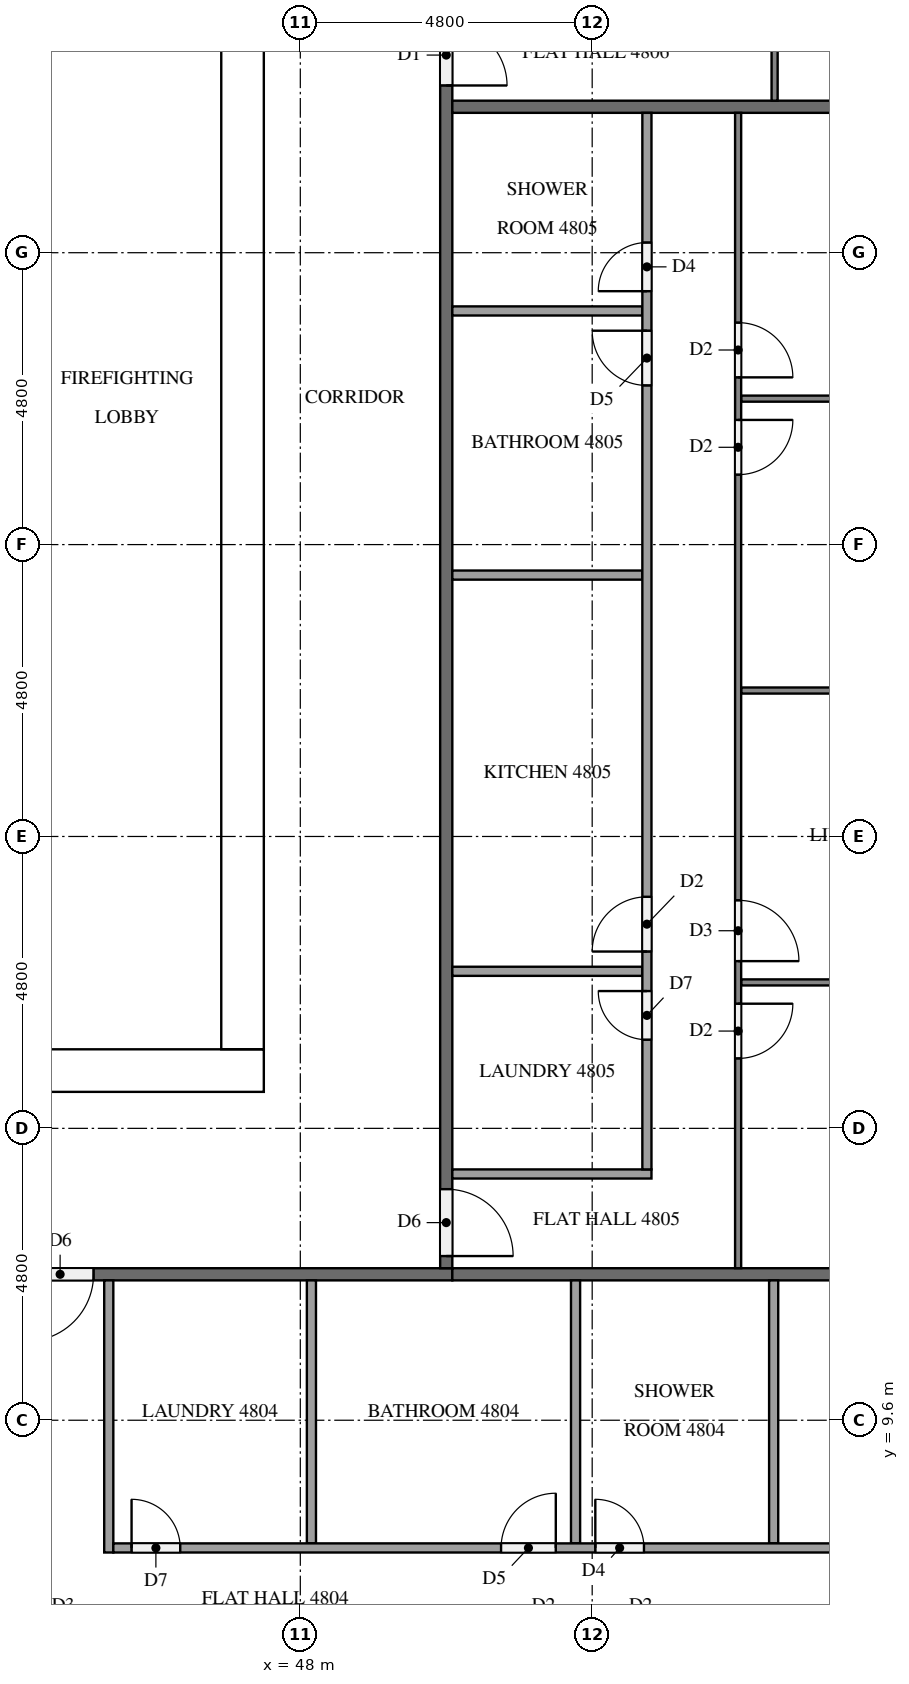
"""IFC4 building model, lengths in metres.
Left out: names, types, materials, properties, quantities, classifications, styles, units other than length and angle.
Written with IfcOpenShell. Run it as: python <this file> out.ifc"""

import sys

from ifc_helpers import new_model, si_unit, direction, frame, frame_2d, origin, place, context, subcontext, project, spatial, rectangle, extrude, element, fill, save


model = new_model("IFC4")
c1 = context("Model", 3, precision=1e-05, world=origin(), true_north=direction((0.0, 1.0)))
c2 = subcontext(c1, "Body", "Model", "MODEL_VIEW")
j1 = project(units=[si_unit("LENGTHUNIT", "METRE"), si_unit("PLANEANGLEUNIT", "RADIAN")], contexts=[c1])
p1 = place(None, origin())
s1 = spatial("IfcSite", under=j1, at=p1, CompositionType="ELEMENT")
p2 = place(p1, origin())
s2 = spatial("IfcBuilding", under=s1, at=p2, CompositionType="ELEMENT")
p3 = place(p2, frame((0.0, 0.0, 185.9)))
s3 = spatial("IfcBuildingStorey", under=s2, at=p3, CompositionType="ELEMENT", Elevation=185.9)
p4 = place(p3, frame((15.0, 15.35, 0.0), z_axis=(0.0, 0.0, 1.0), x_axis=(1.0, 0.0, 0.0)))
e1 = element("IfcWall", 1, at=p4, inside=s3, PredefinedType="SHEAR", context=c2, shape_type="SweptSolid", body=[
    extrude(rectangle(XDim=32.4, YDim=0.7, at=frame_2d((16.2, 0.0))), origin(), (0.0, 0.0, 1.0), 3.2),
])
p5 = place(p4, frame((15.3, 0.0, 0.0)))
e2 = element("IfcOpeningElement", 2, at=p5, cuts=e1, PredefinedType="OPENING", context=c2, shape_type="SweptSolid", body=[
    extrude(rectangle(XDim=1.8, YDim=2.1, at=frame_2d((0.9, 1.05))), frame((0.0, 0.36, 0.0), z_axis=(0.0, -1.0, 0.0), x_axis=(1.0, 0.0, 0.0)), (0.0, 0.0, 1.0), 0.72),
])
p6 = place(p3, frame((47.05, 15.7, 0.0), z_axis=(0.0, 0.0, 1.0), x_axis=(0.0, 1.0, 0.0)))
e3 = element("IfcWall", 3, at=p6, inside=s3, PredefinedType="SHEAR", context=c2, shape_type="SweptSolid", body=[
    extrude(rectangle(XDim=21.4, YDim=0.7, at=frame_2d((10.7, 0.0))), origin(), (0.0, 0.0, 1.0), 3.2),
])
p7 = place(p6, frame((10.4, 0.0, 0.0)))
e4 = element("IfcOpeningElement", 4, at=p7, cuts=e3, PredefinedType="OPENING", context=c2, shape_type="SweptSolid", body=[
    extrude(rectangle(XDim=1.2, YDim=2.1, at=frame_2d((0.6, 1.05))), frame((0.0, 0.36, 0.0), z_axis=(0.0, -1.0, 0.0), x_axis=(1.0, 0.0, 0.0)), (0.0, 0.0, 1.0), 0.72),
])
p8 = place(p3, frame((50.5, 12.0, 0.0), z_axis=(0.0, 0.0, 1.0), x_axis=(-1.0, 0.0, 0.0)))
e5 = element("IfcWall", 5, at=p8, inside=s3, PredefinedType="PARTITIONING", context=c2, shape_type="SweptSolid", body=[
    extrude(rectangle(XDim=38.6, YDim=0.2, at=frame_2d((19.3, 0.0))), origin(), (0.0, 0.0, 1.0), 3.2),
])
p9 = place(p8, frame((31.65, 0.0, 0.0)))
e6 = element("IfcOpeningElement", 6, at=p9, cuts=e5, PredefinedType="OPENING", context=c2, shape_type="SweptSolid", body=[
    extrude(rectangle(XDim=1.0, YDim=2.1, at=frame_2d((0.5, 1.05))), frame((0.0, 0.11, 0.0), z_axis=(0.0, -1.0, 0.0), x_axis=(1.0, 0.0, 0.0)), (0.0, 0.0, 1.0), 0.22),
])
p10 = place(p8, frame((17.25, 0.0, 0.0)))
e7 = element("IfcOpeningElement", 7, at=p10, cuts=e5, PredefinedType="OPENING", context=c2, shape_type="SweptSolid", body=[
    extrude(rectangle(XDim=1.0, YDim=2.1, at=frame_2d((0.5, 1.05))), frame((0.0, 0.11, 0.0), z_axis=(0.0, -1.0, 0.0), x_axis=(1.0, 0.0, 0.0)), (0.0, 0.0, 1.0), 0.22),
])
p11 = place(p8, frame((7.65, 0.0, 0.0)))
e8 = element("IfcOpeningElement", 8, at=p11, cuts=e5, PredefinedType="OPENING", context=c2, shape_type="SweptSolid", body=[
    extrude(rectangle(XDim=1.0, YDim=2.1, at=frame_2d((0.5, 1.05))), frame((0.0, 0.11, 0.0), z_axis=(0.0, -1.0, 0.0), x_axis=(1.0, 0.0, 0.0)), (0.0, 0.0, 1.0), 0.22),
])
p12 = place(p8, frame((5.9, 0.0, 0.0)))
e9 = element("IfcOpeningElement", 9, at=p12, cuts=e5, PredefinedType="OPENING", context=c2, shape_type="SweptSolid", body=[
    extrude(rectangle(XDim=1.1, YDim=2.1, at=frame_2d((0.55, 1.05))), frame((0.0, 0.11, 0.0), z_axis=(0.0, -1.0, 0.0), x_axis=(1.0, 0.0, 0.0)), (0.0, 0.0, 1.0), 0.22),
])
p13 = place(p3, frame((50.4, 40.7, 0.0), z_axis=(0.0, 0.0, 1.0), x_axis=(0.0, -1.0, 0.0)))
e10 = element("IfcWall", 10, at=p13, inside=s3, PredefinedType="PARTITIONING", context=c2, shape_type="SweptSolid", body=[
    extrude(rectangle(XDim=28.6, YDim=0.2, at=frame_2d((14.3, 0.0))), origin(), (0.0, 0.0, 1.0), 3.2),
])
p14 = place(p13, frame((27.3, 0.0, 0.0)))
e11 = element("IfcOpeningElement", 11, at=p14, cuts=e10, PredefinedType="OPENING", context=c2, shape_type="SweptSolid", body=[
    extrude(rectangle(XDim=1.1, YDim=2.1, at=frame_2d((0.55, 1.05))), frame((0.0, 0.11, 0.0), z_axis=(0.0, -1.0, 0.0), x_axis=(1.0, 0.0, 0.0)), (0.0, 0.0, 1.0), 0.22),
])
p15 = place(p13, frame((8.15, 0.0, 0.0)))
e12 = element("IfcOpeningElement", 12, at=p15, cuts=e10, PredefinedType="OPENING", context=c2, shape_type="SweptSolid", body=[
    extrude(rectangle(XDim=1.0, YDim=2.1, at=frame_2d((0.5, 1.05))), frame((0.0, 0.11, 0.0), z_axis=(0.0, -1.0, 0.0), x_axis=(1.0, 0.0, 0.0)), (0.0, 0.0, 1.0), 0.22),
])
p16 = place(p13, frame((0.95, 0.0, 0.0)))
e13 = element("IfcOpeningElement", 13, at=p16, cuts=e10, PredefinedType="OPENING", context=c2, shape_type="SweptSolid", body=[
    extrude(rectangle(XDim=1.0, YDim=2.1, at=frame_2d((0.5, 1.05))), frame((0.0, 0.11, 0.0), z_axis=(0.0, -1.0, 0.0), x_axis=(1.0, 0.0, 0.0)), (0.0, 0.0, 1.0), 0.22),
])
for number, where, z_axis, x_axis in (
    (14, (50.5, 12.0, 0.0), (0.0, 0.0, 1.0), (1.0, 0.0, 0.0)),
    (15, (50.5, 31.2, 0.0), (0.0, 0.0, 1.0), (1.0, 0.0, 0.0)),
):
    element("IfcWall", number, at=place(p3, frame(where, z_axis=z_axis, x_axis=x_axis)), inside=s3, PredefinedType="PARTITIONING", context=c2, shape_type="SweptSolid", body=[
        extrude(rectangle(XDim=11.8, YDim=0.2, at=frame_2d((5.9, 0.0))), origin(), (0.0, 0.0, 1.0), 3.2),
    ])
for number, where, z_axis, x_axis in (
    (16, (48.183, 11.9, 0.0), (0.0, 0.0, 1.0), (0.0, -1.0, 0.0)),
    (17, (52.527, 11.9, 0.0), (0.0, 0.0, 1.0), (0.0, -1.0, 0.0)),
    (18, (55.784, 11.9, 0.0), (0.0, 0.0, 1.0), (0.0, -1.0, 0.0)),
):
    element("IfcWall", number, at=place(p3, frame(where, z_axis=z_axis, x_axis=x_axis)), inside=s3, PredefinedType="PARTITIONING", context=c2, shape_type="SweptSolid", body=[
        extrude(rectangle(XDim=4.325, YDim=0.15, at=frame_2d((2.163, 0.0))), origin(), (0.0, 0.0, 1.0), 3.2),
    ])
p17 = place(p3, frame((44.85, 11.9, 0.0), z_axis=(0.0, 0.0, 1.0), x_axis=(0.0, -1.0, 0.0)))
e19 = element("IfcWall", 19, at=p17, inside=s3, PredefinedType="PARTITIONING", context=c2, shape_type="SweptSolid", body=[
    extrude(rectangle(XDim=4.475, YDim=0.15, at=frame_2d((2.237, 0.0))), origin(), (0.0, 0.0, 1.0), 3.2),
])
p18 = place(p3, frame((44.925, 7.5, 0.0), z_axis=(0.0, 0.0, 1.0), x_axis=(1.0, 0.0, 0.0)))
e20 = element("IfcWall", 20, at=p18, inside=s3, PredefinedType="PARTITIONING", context=c2, shape_type="SweptSolid", body=[
    extrude(rectangle(XDim=17.375, YDim=0.15, at=frame_2d((8.688, 0.0))), origin(), (0.0, 0.0, 1.0), 3.2),
])
p19 = place(p18, frame((0.3, 0.0, 0.0)))
e21 = element("IfcOpeningElement", 21, at=p19, cuts=e20, PredefinedType="OPENING", context=c2, shape_type="SweptSolid", body=[
    extrude(rectangle(XDim=0.8, YDim=2.1, at=frame_2d((0.4, 1.05))), frame((0.0, 0.085, 0.0), z_axis=(0.0, -1.0, 0.0), x_axis=(1.0, 0.0, 0.0)), (0.0, 0.0, 1.0), 0.17),
])
p20 = place(p18, frame((6.377, 0.0, 0.0)))
e22 = element("IfcOpeningElement", 22, at=p20, cuts=e20, PredefinedType="OPENING", context=c2, shape_type="SweptSolid", body=[
    extrude(rectangle(XDim=0.9, YDim=2.1, at=frame_2d((0.45, 1.05))), frame((0.0, 0.085, 0.0), z_axis=(0.0, -1.0, 0.0), x_axis=(1.0, 0.0, 0.0)), (0.0, 0.0, 1.0), 0.17),
])
p21 = place(p18, frame((7.927, 0.0, 0.0)))
e23 = element("IfcOpeningElement", 23, at=p21, cuts=e20, PredefinedType="OPENING", context=c2, shape_type="SweptSolid", body=[
    extrude(rectangle(XDim=0.8, YDim=2.1, at=frame_2d((0.4, 1.05))), frame((0.0, 0.085, 0.0), z_axis=(0.0, -1.0, 0.0), x_axis=(1.0, 0.0, 0.0)), (0.0, 0.0, 1.0), 0.17),
])
p22 = place(p18, frame((16.125, 0.0, 0.0)))
e24 = element("IfcOpeningElement", 24, at=p22, cuts=e20, PredefinedType="OPENING", context=c2, shape_type="SweptSolid", body=[
    extrude(rectangle(XDim=0.9, YDim=2.1, at=frame_2d((0.45, 1.05))), frame((0.0, 0.085, 0.0), z_axis=(0.0, -1.0, 0.0), x_axis=(1.0, 0.0, 0.0)), (0.0, 0.0, 1.0), 0.17),
])
for number, where, z_axis, x_axis in (
    (25, (55.25, 16.8, 0.0), (0.0, 0.0, 1.0), (1.0, 0.0, 0.0)),
    (26, (55.25, 21.6, 0.0), (0.0, 0.0, 1.0), (1.0, 0.0, 0.0)),
    (27, (55.25, 26.4, 0.0), (0.0, 0.0, 1.0), (1.0, 0.0, 0.0)),
):
    element("IfcWall", number, at=place(p3, frame(where, z_axis=z_axis, x_axis=x_axis)), inside=s3, PredefinedType="PARTITIONING", context=c2, shape_type="SweptSolid", body=[
        extrude(rectangle(XDim=7.05, YDim=0.1, at=frame_2d((3.525, 0.0))), origin(), (0.0, 0.0, 1.0), 3.2),
    ])
p23 = place(p3, frame((55.2, 31.1, 0.0), z_axis=(0.0, 0.0, 1.0), x_axis=(0.0, -1.0, 0.0)))
e28 = element("IfcWall", 28, at=p23, inside=s3, PredefinedType="PARTITIONING", context=c2, shape_type="SweptSolid", body=[
    extrude(rectangle(XDim=19.0, YDim=0.1, at=frame_2d((9.5, 0.0))), origin(), (0.0, 0.0, 1.0), 3.2),
])
p24 = place(p23, frame((14.65, 0.0, 0.0)))
e29 = element("IfcOpeningElement", 29, at=p24, cuts=e28, PredefinedType="OPENING", context=c2, shape_type="SweptSolid", body=[
    extrude(rectangle(XDim=0.9, YDim=2.1, at=frame_2d((0.45, 1.05))), frame((0.0, 0.06, 0.0), z_axis=(0.0, -1.0, 0.0), x_axis=(1.0, 0.0, 0.0)), (0.0, 0.0, 1.0), 0.12),
])
p25 = place(p23, frame((12.95, 0.0, 0.0)))
e30 = element("IfcOpeningElement", 30, at=p25, cuts=e28, PredefinedType="OPENING", context=c2, shape_type="SweptSolid", body=[
    extrude(rectangle(XDim=1.0, YDim=2.1, at=frame_2d((0.5, 1.05))), frame((0.0, 0.06, 0.0), z_axis=(0.0, -1.0, 0.0), x_axis=(1.0, 0.0, 0.0)), (0.0, 0.0, 1.0), 0.12),
])
p26 = place(p23, frame((5.05, 0.0, 0.0)))
e31 = element("IfcOpeningElement", 31, at=p26, cuts=e28, PredefinedType="OPENING", context=c2, shape_type="SweptSolid", body=[
    extrude(rectangle(XDim=0.9, YDim=2.1, at=frame_2d((0.45, 1.05))), frame((0.0, 0.06, 0.0), z_axis=(0.0, -1.0, 0.0), x_axis=(1.0, 0.0, 0.0)), (0.0, 0.0, 1.0), 0.12),
])
p27 = place(p23, frame((3.45, 0.0, 0.0)))
e32 = element("IfcOpeningElement", 32, at=p27, cuts=e28, PredefinedType="OPENING", context=c2, shape_type="SweptSolid", body=[
    extrude(rectangle(XDim=0.9, YDim=2.1, at=frame_2d((0.45, 1.05))), frame((0.0, 0.06, 0.0), z_axis=(0.0, -1.0, 0.0), x_axis=(1.0, 0.0, 0.0)), (0.0, 0.0, 1.0), 0.12),
])
for number, where, z_axis, x_axis in (
    (33, (50.5, 16.983, 0.0), (0.0, 0.0, 1.0), (1.0, 0.0, 0.0)),
    (34, (50.5, 23.498, 0.0), (0.0, 0.0, 1.0), (1.0, 0.0, 0.0)),
    (35, (50.5, 27.842, 0.0), (0.0, 0.0, 1.0), (1.0, 0.0, 0.0)),
):
    element("IfcWall", number, at=place(p3, frame(where, z_axis=z_axis, x_axis=x_axis)), inside=s3, PredefinedType="PARTITIONING", context=c2, shape_type="SweptSolid", body=[
        extrude(rectangle(XDim=3.125, YDim=0.15, at=frame_2d((1.562, 0.0))), origin(), (0.0, 0.0, 1.0), 3.2),
    ])
p28 = place(p3, frame((50.5, 13.65, 0.0), z_axis=(0.0, 0.0, 1.0), x_axis=(1.0, 0.0, 0.0)))
e36 = element("IfcWall", 36, at=p28, inside=s3, PredefinedType="PARTITIONING", context=c2, shape_type="SweptSolid", body=[
    extrude(rectangle(XDim=3.275, YDim=0.15, at=frame_2d((1.637, 0.0))), origin(), (0.0, 0.0, 1.0), 3.2),
])
p29 = place(p3, frame((53.7, 13.725, 0.0), z_axis=(0.0, 0.0, 1.0), x_axis=(0.0, 1.0, 0.0)))
e37 = element("IfcWall", 37, at=p29, inside=s3, PredefinedType="PARTITIONING", context=c2, shape_type="SweptSolid", body=[
    extrude(rectangle(XDim=17.375, YDim=0.15, at=frame_2d((8.688, 0.0))), origin(), (0.0, 0.0, 1.0), 3.2),
])
p30 = place(p29, frame((2.133, 0.0, 0.0)))
e38 = element("IfcOpeningElement", 38, at=p30, cuts=e37, PredefinedType="OPENING", context=c2, shape_type="SweptSolid", body=[
    extrude(rectangle(XDim=0.8, YDim=2.1, at=frame_2d((0.4, 1.05))), frame((0.0, 0.085, 0.0), z_axis=(0.0, -1.0, 0.0), x_axis=(1.0, 0.0, 0.0)), (0.0, 0.0, 1.0), 0.17),
])
p31 = place(p29, frame((3.583, 0.0, 0.0)))
e39 = element("IfcOpeningElement", 39, at=p31, cuts=e37, PredefinedType="OPENING", context=c2, shape_type="SweptSolid", body=[
    extrude(rectangle(XDim=0.9, YDim=2.1, at=frame_2d((0.45, 1.05))), frame((0.0, 0.085, 0.0), z_axis=(0.0, -1.0, 0.0), x_axis=(1.0, 0.0, 0.0)), (0.0, 0.0, 1.0), 0.17),
])
p32 = place(p29, frame((12.892, 0.0, 0.0)))
e40 = element("IfcOpeningElement", 40, at=p32, cuts=e37, PredefinedType="OPENING", context=c2, shape_type="SweptSolid", body=[
    extrude(rectangle(XDim=0.9, YDim=2.1, at=frame_2d((0.45, 1.05))), frame((0.0, 0.085, 0.0), z_axis=(0.0, -1.0, 0.0), x_axis=(1.0, 0.0, 0.0)), (0.0, 0.0, 1.0), 0.17),
])
p33 = place(p29, frame((14.442, 0.0, 0.0)))
e41 = element("IfcOpeningElement", 41, at=p33, cuts=e37, PredefinedType="OPENING", context=c2, shape_type="SweptSolid", body=[
    extrude(rectangle(XDim=0.8, YDim=2.1, at=frame_2d((0.4, 1.05))), frame((0.0, 0.085, 0.0), z_axis=(0.0, -1.0, 0.0), x_axis=(1.0, 0.0, 0.0)), (0.0, 0.0, 1.0), 0.17),
])
p34 = place(p3, frame((55.8, 38.3, 0.0), z_axis=(0.0, 0.0, 1.0), x_axis=(0.0, -1.0, 0.0)))
e42 = element("IfcWall", 42, at=p34, inside=s3, PredefinedType="PARTITIONING", context=c2, shape_type="SweptSolid", body=[
    extrude(rectangle(XDim=7.0, YDim=0.1, at=frame_2d((3.5, 0.0))), origin(), (0.0, 0.0, 1.0), 3.2),
])
p35 = place(p34, frame((0.3, 0.0, 0.0)))
e43 = element("IfcOpeningElement", 43, at=p35, cuts=e42, PredefinedType="OPENING", context=c2, shape_type="SweptSolid", body=[
    extrude(rectangle(XDim=1.0, YDim=2.1, at=frame_2d((0.5, 1.05))), frame((0.0, 0.06, 0.0), z_axis=(0.0, -1.0, 0.0), x_axis=(1.0, 0.0, 0.0)), (0.0, 0.0, 1.0), 0.12),
])
p36 = place(p7, origin())
e44 = element("IfcDoor", 44, at=p36, inside=s3, OperationType="SINGLE_SWING_RIGHT", PredefinedType="DOOR", context=c2, shape_type="SweptSolid", body=[
    extrude(rectangle(XDim=1.2, YDim=2.1, at=frame_2d((0.6, 1.05))), frame((0.0, 0.025, 0.0), z_axis=(0.0, -1.0, 0.0), x_axis=(1.0, 0.0, 0.0)), (0.0, 0.0, 1.0), 0.05),
])
fill(e4, e44)
p37 = place(p12, origin())
e45 = element("IfcDoor", 45, at=p37, inside=s3, OperationType="SINGLE_SWING_RIGHT", PredefinedType="DOOR", context=c2, shape_type="SweptSolid", body=[
    extrude(rectangle(XDim=1.1, YDim=2.1, at=frame_2d((0.55, 1.05))), frame((0.0, 0.025, 0.0), z_axis=(0.0, -1.0, 0.0), x_axis=(1.0, 0.0, 0.0)), (0.0, 0.0, 1.0), 0.05),
])
fill(e9, e45)
p38 = place(p14, origin())
e46 = element("IfcDoor", 46, at=p38, inside=s3, OperationType="SINGLE_SWING_RIGHT", PredefinedType="DOOR", context=c2, shape_type="SweptSolid", body=[
    extrude(rectangle(XDim=1.1, YDim=2.1, at=frame_2d((0.55, 1.05))), frame((0.0, 0.025, 0.0), z_axis=(0.0, -1.0, 0.0), x_axis=(1.0, 0.0, 0.0)), (0.0, 0.0, 1.0), 0.05),
])
fill(e11, e46)
p39 = place(p15, origin())
e47 = element("IfcDoor", 47, at=p39, inside=s3, OperationType="SINGLE_SWING_RIGHT", PredefinedType="DOOR", context=c2, shape_type="SweptSolid", body=[
    extrude(rectangle(XDim=1.0, YDim=2.1, at=frame_2d((0.5, 1.05))), frame((0.0, 0.025, 0.0), z_axis=(0.0, -1.0, 0.0), x_axis=(1.0, 0.0, 0.0)), (0.0, 0.0, 1.0), 0.05),
])
fill(e12, e47)
p40 = place(p19, origin())
e48 = element("IfcDoor", 48, at=p40, inside=s3, OperationType="SINGLE_SWING_LEFT", PredefinedType="DOOR", context=c2, shape_type="SweptSolid", body=[
    extrude(rectangle(XDim=0.8, YDim=2.1, at=frame_2d((0.4, 1.05))), frame((0.0, 0.025, 0.0), z_axis=(0.0, -1.0, 0.0), x_axis=(1.0, 0.0, 0.0)), (0.0, 0.0, 1.0), 0.05),
])
fill(e21, e48)
p41 = place(p20, origin())
e49 = element("IfcDoor", 49, at=p41, inside=s3, OperationType="SINGLE_SWING_RIGHT", PredefinedType="DOOR", context=c2, shape_type="SweptSolid", body=[
    extrude(rectangle(XDim=0.9, YDim=2.1, at=frame_2d((0.45, 1.05))), frame((0.0, 0.025, 0.0), z_axis=(0.0, -1.0, 0.0), x_axis=(1.0, 0.0, 0.0)), (0.0, 0.0, 1.0), 0.05),
])
fill(e22, e49)
p42 = place(p21, origin())
e50 = element("IfcDoor", 50, at=p42, inside=s3, OperationType="SINGLE_SWING_LEFT", PredefinedType="DOOR", context=c2, shape_type="SweptSolid", body=[
    extrude(rectangle(XDim=0.8, YDim=2.1, at=frame_2d((0.4, 1.05))), frame((0.0, 0.025, 0.0), z_axis=(0.0, -1.0, 0.0), x_axis=(1.0, 0.0, 0.0)), (0.0, 0.0, 1.0), 0.05),
])
fill(e23, e50)
p43 = place(p24, origin())
e51 = element("IfcDoor", 51, at=p43, inside=s3, OperationType="SINGLE_SWING_LEFT", PredefinedType="DOOR", context=c2, shape_type="SweptSolid", body=[
    extrude(rectangle(XDim=0.9, YDim=2.1, at=frame_2d((0.45, 1.05))), frame((0.0, 0.025, 0.0), z_axis=(0.0, -1.0, 0.0), x_axis=(1.0, 0.0, 0.0)), (0.0, 0.0, 1.0), 0.05),
])
fill(e29, e51)
p44 = place(p25, origin())
e52 = element("IfcDoor", 52, at=p44, inside=s3, OperationType="SINGLE_SWING_RIGHT", PredefinedType="DOOR", context=c2, shape_type="SweptSolid", body=[
    extrude(rectangle(XDim=1.0, YDim=2.1, at=frame_2d((0.5, 1.05))), frame((0.0, 0.025, 0.0), z_axis=(0.0, -1.0, 0.0), x_axis=(1.0, 0.0, 0.0)), (0.0, 0.0, 1.0), 0.05),
])
fill(e30, e52)
p45 = place(p26, origin())
e53 = element("IfcDoor", 53, at=p45, inside=s3, OperationType="SINGLE_SWING_LEFT", PredefinedType="DOOR", context=c2, shape_type="SweptSolid", body=[
    extrude(rectangle(XDim=0.9, YDim=2.1, at=frame_2d((0.45, 1.05))), frame((0.0, 0.025, 0.0), z_axis=(0.0, -1.0, 0.0), x_axis=(1.0, 0.0, 0.0)), (0.0, 0.0, 1.0), 0.05),
])
fill(e31, e53)
p46 = place(p27, origin())
e54 = element("IfcDoor", 54, at=p46, inside=s3, OperationType="SINGLE_SWING_RIGHT", PredefinedType="DOOR", context=c2, shape_type="SweptSolid", body=[
    extrude(rectangle(XDim=0.9, YDim=2.1, at=frame_2d((0.45, 1.05))), frame((0.0, 0.025, 0.0), z_axis=(0.0, -1.0, 0.0), x_axis=(1.0, 0.0, 0.0)), (0.0, 0.0, 1.0), 0.05),
])
fill(e32, e54)
p47 = place(p30, origin())
e55 = element("IfcDoor", 55, at=p47, inside=s3, OperationType="SINGLE_SWING_RIGHT", PredefinedType="DOOR", context=c2, shape_type="SweptSolid", body=[
    extrude(rectangle(XDim=0.8, YDim=2.1, at=frame_2d((0.4, 1.05))), frame((0.0, 0.025, 0.0), z_axis=(0.0, -1.0, 0.0), x_axis=(1.0, 0.0, 0.0)), (0.0, 0.0, 1.0), 0.05),
])
fill(e38, e55)
p48 = place(p31, origin())
e56 = element("IfcDoor", 56, at=p48, inside=s3, OperationType="SINGLE_SWING_LEFT", PredefinedType="DOOR", context=c2, shape_type="SweptSolid", body=[
    extrude(rectangle(XDim=0.9, YDim=2.1, at=frame_2d((0.45, 1.05))), frame((0.0, 0.025, 0.0), z_axis=(0.0, -1.0, 0.0), x_axis=(1.0, 0.0, 0.0)), (0.0, 0.0, 1.0), 0.05),
])
fill(e39, e56)
p49 = place(p32, origin())
e57 = element("IfcDoor", 57, at=p49, inside=s3, OperationType="SINGLE_SWING_RIGHT", PredefinedType="DOOR", context=c2, shape_type="SweptSolid", body=[
    extrude(rectangle(XDim=0.9, YDim=2.1, at=frame_2d((0.45, 1.05))), frame((0.0, 0.025, 0.0), z_axis=(0.0, -1.0, 0.0), x_axis=(1.0, 0.0, 0.0)), (0.0, 0.0, 1.0), 0.05),
])
fill(e40, e57)
p50 = place(p33, origin())
e58 = element("IfcDoor", 58, at=p50, inside=s3, OperationType="SINGLE_SWING_LEFT", PredefinedType="DOOR", context=c2, shape_type="SweptSolid", body=[
    extrude(rectangle(XDim=0.8, YDim=2.1, at=frame_2d((0.4, 1.05))), frame((0.0, 0.025, 0.0), z_axis=(0.0, -1.0, 0.0), x_axis=(1.0, 0.0, 0.0)), (0.0, 0.0, 1.0), 0.05),
])
fill(e41, e58)
save(model, sys.argv[1])
